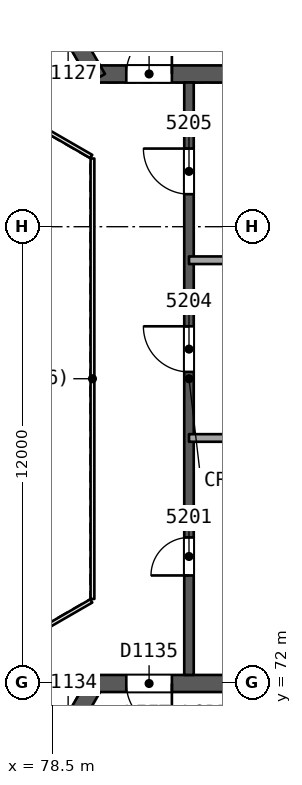
"""IFC4 building model, lengths in metres.
Left out: names, types, materials, properties, quantities, classifications, styles, units other than length and angle.
Written with IfcOpenShell. Run it as: python <this file> out.ifc"""

import sys

from ifc_helpers import new_model, si_unit, direction, frame, frame_2d, origin, place, context, subcontext, project, spatial, rectangle, extrude, element, fill, save


model = new_model("IFC4")
c1 = context("Model", 3, precision=1e-05, world=origin(), true_north=direction((0.0, 1.0)))
c2 = subcontext(c1, "Body", "Model", "MODEL_VIEW")
j1 = project(units=[si_unit("LENGTHUNIT", "METRE"), si_unit("PLANEANGLEUNIT", "RADIAN")], contexts=[c1])
p1 = place(None, origin())
s1 = spatial("IfcSite", under=j1, at=p1, CompositionType="ELEMENT")
p2 = place(p1, origin())
s2 = spatial("IfcBuilding", under=s1, at=p2, CompositionType="ELEMENT")
p3 = place(p2, frame((0.0, 0.0, 213.2)))
s3 = spatial("IfcBuildingStorey", under=s2, at=p3, CompositionType="ELEMENT", Elevation=213.2)
p4 = place(p3, frame((79.63, 88.019, 0.0), z_axis=(0.0, 0.0, 1.0), x_axis=(1.0, 0.0, 0.0)))
e1 = element("IfcWall", 1, at=p4, inside=s3, PredefinedType="SHEAR", context=c2, shape_type="SweptSolid", body=[
    extrude(rectangle(XDim=10.25, YDim=0.45, at=frame_2d((5.125, 0.0))), origin(), (0.0, 0.0, 1.0), 3.7),
])
p5 = place(p4, frame((0.82, 0.0, 0.0)))
e2 = element("IfcOpeningElement", 2, at=p5, cuts=e1, PredefinedType="OPENING", context=c2, shape_type="SweptSolid", body=[
    extrude(rectangle(XDim=1.2, YDim=2.1, at=frame_2d((0.6, 1.05))), frame((0.0, 0.235, 0.0), z_axis=(0.0, -1.0, 0.0), x_axis=(1.0, 0.0, 0.0)), (0.0, 0.0, 1.0), 0.471),
])
p6 = place(p3, frame((74.617, 96.701, 0.0), z_axis=(0.0, 0.0, 1.0), x_axis=(0.499994385119, -0.866028645513, 0.0)))
e3 = element("IfcWall", 3, at=p6, inside=s3, PredefinedType="SHEAR", context=c2, shape_type="SweptSolid", body=[
    extrude(rectangle(XDim=10.155, YDim=0.45, at=frame_2d((5.077, 0.0))), origin(), (0.0, 0.0, 1.0), 3.7),
])
p7 = place(p6, frame((8.005, 0.0, 0.0)))
e4 = element("IfcOpeningElement", 4, at=p7, cuts=e3, PredefinedType="OPENING", context=c2, shape_type="SweptSolid", body=[
    extrude(rectangle(XDim=1.2, YDim=2.1, at=frame_2d((0.6, 1.05))), frame((0.0, 0.235, 0.0), z_axis=(0.0, -1.0, 0.0), x_axis=(1.0, 0.0, 0.0)), (0.0, 0.0, 1.0), 0.471),
])
p8 = place(p3, frame((79.63, 71.981, 0.0), z_axis=(0.0, 0.0, 1.0), x_axis=(-0.500002171595, -0.86602415001, 0.0)))
e5 = element("IfcWall", 5, at=p8, inside=s3, PredefinedType="SHEAR", context=c2, shape_type="SweptSolid", body=[
    extrude(rectangle(XDim=10.25, YDim=0.45, at=frame_2d((5.125, 0.0))), origin(), (0.0, 0.0, 1.0), 3.7),
])
p9 = place(p8, frame((0.82, 0.0, 0.0)))
e6 = element("IfcOpeningElement", 6, at=p9, cuts=e5, PredefinedType="OPENING", context=c2, shape_type="SweptSolid", body=[
    extrude(rectangle(XDim=1.2, YDim=2.1, at=frame_2d((0.6, 1.05))), frame((0.0, 0.235, 0.0), z_axis=(0.0, -1.0, 0.0), x_axis=(1.0, 0.0, 0.0)), (0.0, 0.0, 1.0), 0.471),
])
p10 = place(p3, frame((89.655, 71.981, 0.0), z_axis=(0.0, 0.0, 1.0), x_axis=(-1.0, 0.0, 0.0)))
e7 = element("IfcWall", 7, at=p10, inside=s3, PredefinedType="SHEAR", context=c2, shape_type="SweptSolid", body=[
    extrude(rectangle(XDim=10.155, YDim=0.45, at=frame_2d((5.078, 0.0))), origin(), (0.0, 0.0, 1.0), 3.7),
])
p11 = place(p10, frame((8.005, 0.0, 0.0)))
e8 = element("IfcOpeningElement", 8, at=p11, cuts=e7, PredefinedType="OPENING", context=c2, shape_type="SweptSolid", body=[
    extrude(rectangle(XDim=1.2, YDim=2.1, at=frame_2d((0.6, 1.05))), frame((0.0, 0.235, 0.0), z_axis=(0.0, -1.0, 0.0), x_axis=(1.0, 0.0, 0.0)), (0.0, 0.0, 1.0), 0.471),
])
p12 = place(p3, frame((82.1, 72.206, 0.0), z_axis=(0.0, 0.0, 1.0), x_axis=(0.0, 1.0, 0.0)))
e9 = element("IfcWall", 9, at=p12, inside=s3, PredefinedType="SHEAR", context=c2, shape_type="SweptSolid", body=[
    extrude(rectangle(XDim=15.588, YDim=0.25, at=frame_2d((7.794, 0.0))), origin(), (0.0, 0.0, 1.0), 3.3),
])
p13 = place(p12, frame((2.618, 0.0, 0.0)))
e10 = element("IfcOpeningElement", 10, at=p13, cuts=e9, PredefinedType="OPENING", context=c2, shape_type="SweptSolid", body=[
    extrude(rectangle(XDim=1.0, YDim=2.1, at=frame_2d((0.5, 1.05))), frame((0.0, 0.135, 0.0), z_axis=(0.0, -1.0, 0.0), x_axis=(1.0, 0.0, 0.0)), (0.0, 0.0, 1.0), 0.271),
])
p14 = place(p12, frame((7.974, 0.0, 0.0)))
e11 = element("IfcOpeningElement", 11, at=p14, cuts=e9, PredefinedType="OPENING", context=c2, shape_type="SweptSolid", body=[
    extrude(rectangle(XDim=1.2, YDim=2.4, at=frame_2d((0.6, 1.2))), frame((0.0, 0.135, 0.0), z_axis=(0.0, -1.0, 0.0), x_axis=(1.0, 0.0, 0.0)), (0.0, 0.0, 1.0), 0.271),
])
p15 = place(p12, frame((12.65, 0.0, 0.0)))
e12 = element("IfcOpeningElement", 12, at=p15, cuts=e9, PredefinedType="OPENING", context=c2, shape_type="SweptSolid", body=[
    extrude(rectangle(XDim=1.2, YDim=2.4, at=frame_2d((0.6, 1.2))), frame((0.0, 0.135, 0.0), z_axis=(0.0, -1.0, 0.0), x_axis=(1.0, 0.0, 0.0)), (0.0, 0.0, 1.0), 0.271),
])
for number, where, z_axis, x_axis in (
    (13, (92.652, 78.441, 0.0), (0.0, 0.0, 1.0), (-1.0, 0.0, 0.0)),
    (14, (92.652, 83.118, 0.0), (0.0, 0.0, 1.0), (-1.0, 0.0, 0.0)),
):
    element("IfcWall", number, at=place(p3, frame(where, z_axis=z_axis, x_axis=x_axis)), inside=s3, PredefinedType="PARTITIONING", context=c2, shape_type="SweptSolid", body=[
        extrude(rectangle(XDim=10.552, YDim=0.2, at=frame_2d((5.276, 0.0))), origin(), (0.0, 0.0, 1.0), 3.3),
    ])
p16 = place(p3, frame((43.933, 82.619, 0.0), z_axis=(0.0, 0.0, 1.0), x_axis=(0.866026349667, 0.49999836168, 0.0)))
e15 = element("IfcWall", 15, at=p16, inside=s3, PredefinedType="SOLIDWALL", context=c2, shape_type="SweptSolid", body=[
    extrude(rectangle(XDim=51.192, YDim=0.3, at=frame_2d((25.596, 0.0))), origin(), (0.0, 0.0, 1.0), 3.3),
])
p17 = place(p16, frame((24.552, 0.0, 0.0)))
e16 = element("IfcOpeningElement", 16, at=p17, cuts=e15, PredefinedType="OPENING", context=c2, shape_type="SweptSolid", body=[
    extrude(rectangle(XDim=2.4, YDim=2.4, at=frame_2d((1.2, 1.2))), frame((0.0, 0.161, 0.0), z_axis=(0.0, -1.0, 0.0), x_axis=(1.0, 0.0, 0.0)), (0.0, 0.0, 1.0), 0.321),
])
p18 = place(p16, frame((29.228, 0.0, 0.0)))
e17 = element("IfcOpeningElement", 17, at=p18, cuts=e15, PredefinedType="OPENING", context=c2, shape_type="SweptSolid", body=[
    extrude(rectangle(XDim=2.4, YDim=2.4, at=frame_2d((1.2, 1.2))), frame((0.0, 0.161, 0.0), z_axis=(0.0, -1.0, 0.0), x_axis=(1.0, 0.0, 0.0)), (0.0, 0.0, 1.0), 0.321),
])
p19 = place(p16, frame((39.819, 0.0, 0.0)))
e18 = element("IfcOpeningElement", 18, at=p19, cuts=e15, PredefinedType="OPENING", context=c2, shape_type="SweptSolid", body=[
    extrude(rectangle(XDim=2.4, YDim=2.4, at=frame_2d((1.2, 1.2))), frame((0.0, 0.161, 0.0), z_axis=(0.0, -1.0, 0.0), x_axis=(1.0, 0.0, 0.0)), (0.0, 0.0, 1.0), 0.321),
])
p20 = place(p16, frame((19.719, 0.0, 0.0)))
e19 = element("IfcOpeningElement", 19, at=p20, cuts=e15, PredefinedType="OPENING", context=c2, shape_type="SweptSolid", body=[
    extrude(rectangle(XDim=2.4, YDim=2.4, at=frame_2d((1.2, 1.2))), frame((0.0, 0.161, 0.0), z_axis=(0.0, -1.0, 0.0), x_axis=(1.0, 0.0, 0.0)), (0.0, 0.0, 1.0), 0.321),
])
p21 = place(p16, frame((8.993, 0.0, 0.0)))
e20 = element("IfcOpeningElement", 20, at=p21, cuts=e15, PredefinedType="OPENING", context=c2, shape_type="SweptSolid", body=[
    extrude(rectangle(XDim=2.4, YDim=2.4, at=frame_2d((1.2, 1.2))), frame((0.0, 0.161, 0.0), z_axis=(0.0, -1.0, 0.0), x_axis=(1.0, 0.0, 0.0)), (0.0, 0.0, 1.0), 0.321),
])
p22 = place(p3, frame((88.266, 51.786, 0.0), z_axis=(0.0, 0.0, 1.0), x_axis=(-0.866026349667, 0.49999836168, 0.0)))
e21 = element("IfcWall", 21, at=p22, inside=s3, PredefinedType="SOLIDWALL", context=c2, shape_type="SweptSolid", body=[
    extrude(rectangle(XDim=51.192, YDim=0.3, at=frame_2d((25.596, 0.0))), origin(), (0.0, 0.0, 1.0), 3.3),
])
p23 = place(p22, frame((24.864, 0.0, 0.0)))
e22 = element("IfcOpeningElement", 22, at=p23, cuts=e21, PredefinedType="OPENING", context=c2, shape_type="SweptSolid", body=[
    extrude(rectangle(XDim=2.4, YDim=2.4, at=frame_2d((1.2, 1.2))), frame((0.0, 0.161, 0.0), z_axis=(0.0, -1.0, 0.0), x_axis=(1.0, 0.0, 0.0)), (0.0, 0.0, 1.0), 0.321),
])
p24 = place(p22, frame((19.719, 0.0, 0.0)))
e23 = element("IfcOpeningElement", 23, at=p24, cuts=e21, PredefinedType="OPENING", context=c2, shape_type="SweptSolid", body=[
    extrude(rectangle(XDim=2.4, YDim=2.4, at=frame_2d((1.2, 1.2))), frame((0.0, 0.161, 0.0), z_axis=(0.0, -1.0, 0.0), x_axis=(1.0, 0.0, 0.0)), (0.0, 0.0, 1.0), 0.321),
])
p25 = place(p22, frame((8.993, 0.0, 0.0)))
e24 = element("IfcOpeningElement", 24, at=p25, cuts=e21, PredefinedType="OPENING", context=c2, shape_type="SweptSolid", body=[
    extrude(rectangle(XDim=2.4, YDim=2.4, at=frame_2d((1.2, 1.2))), frame((0.0, 0.161, 0.0), z_axis=(0.0, -1.0, 0.0), x_axis=(1.0, 0.0, 0.0)), (0.0, 0.0, 1.0), 0.321),
])
p26 = place(p22, frame((38.484, 0.0, 0.0)))
e25 = element("IfcOpeningElement", 25, at=p26, cuts=e21, PredefinedType="OPENING", context=c2, shape_type="SweptSolid", body=[
    extrude(rectangle(XDim=2.4, YDim=2.4, at=frame_2d((1.2, 1.2))), frame((0.0, 0.161, 0.0), z_axis=(0.0, -1.0, 0.0), x_axis=(1.0, 0.0, 0.0)), (0.0, 0.0, 1.0), 0.321),
])
p27 = place(p3, frame((79.56, 74.206, 0.0), z_axis=(0.0, 0.0, 1.0), x_axis=(0.0, 1.0, 0.0)))
e26 = element("IfcWall", 26, at=p27, inside=s3, PredefinedType="PARTITIONING", context=c2, shape_type="SweptSolid", body=[
    extrude(rectangle(XDim=11.588, YDim=0.1, at=frame_2d((5.794, 0.0))), origin(), (0.0, 0.0, 1.0), 3.3),
])
for number, where, z_axis, x_axis in (
    (27, (79.53, 85.846, 0.0), (0.0, 0.0, 1.0), (-0.866, 0.5, 0.0)),
    (28, (77.798, 73.154, 0.0), (0.0, 0.0, 1.0), (0.866, 0.5, 0.0)),
):
    element("IfcWall", number, at=place(p3, frame(where, z_axis=z_axis, x_axis=x_axis)), inside=s3, PredefinedType="PARTITIONING", context=c2, shape_type="SweptSolid", body=[
        extrude(rectangle(XDim=2.0, YDim=0.1, at=frame_2d((1.0, 0.0))), origin(), (0.0, 0.0, 1.0), 3.3),
    ])
p28 = place(p13, origin())
e29 = element("IfcDoor", 29, at=p28, inside=s3, OperationType="SINGLE_SWING_LEFT", PredefinedType="NOTDEFINED", context=c2, shape_type="SweptSolid", body=[
    extrude(rectangle(XDim=1.0, YDim=2.1, at=frame_2d((0.5, 1.05))), frame((0.0, 0.025, 0.0), z_axis=(0.0, -1.0, 0.0), x_axis=(1.0, 0.0, 0.0)), (0.0, 0.0, 1.0), 0.05),
])
fill(e10, e29)
p29 = place(p14, origin())
e30 = element("IfcDoor", 30, at=p29, inside=s3, OperationType="SINGLE_SWING_RIGHT", PredefinedType="NOTDEFINED", context=c2, shape_type="SweptSolid", body=[
    extrude(rectangle(XDim=1.2, YDim=2.4, at=frame_2d((0.6, 1.2))), frame((0.0, 0.025, 0.0), z_axis=(0.0, -1.0, 0.0), x_axis=(1.0, 0.0, 0.0)), (0.0, 0.0, 1.0), 0.05),
])
fill(e11, e30)
p30 = place(p15, origin())
e31 = element("IfcDoor", 31, at=p30, inside=s3, OperationType="SINGLE_SWING_RIGHT", PredefinedType="NOTDEFINED", context=c2, shape_type="SweptSolid", body=[
    extrude(rectangle(XDim=1.2, YDim=2.4, at=frame_2d((0.6, 1.2))), frame((0.0, 0.025, 0.0), z_axis=(0.0, -1.0, 0.0), x_axis=(1.0, 0.0, 0.0)), (0.0, 0.0, 1.0), 0.05),
])
fill(e12, e31)
p31 = place(p5, origin())
e32 = element("IfcDoor", 32, at=p31, inside=s3, OperationType="SINGLE_SWING_RIGHT", PredefinedType="NOTDEFINED", context=c2, shape_type="SweptSolid", body=[
    extrude(rectangle(XDim=1.2, YDim=2.1, at=frame_2d((0.6, 1.05))), frame((0.0, 0.025, 0.0), z_axis=(0.0, -1.0, 0.0), x_axis=(1.0, 0.0, 0.0)), (0.0, 0.0, 1.0), 0.05),
])
fill(e2, e32)
p32 = place(p11, origin())
e33 = element("IfcDoor", 33, at=p32, inside=s3, OperationType="SINGLE_SWING_LEFT", PredefinedType="NOTDEFINED", context=c2, shape_type="SweptSolid", body=[
    extrude(rectangle(XDim=1.2, YDim=2.1, at=frame_2d((0.6, 1.05))), frame((0.0, 0.025, 0.0), z_axis=(0.0, -1.0, 0.0), x_axis=(1.0, 0.0, 0.0)), (0.0, 0.0, 1.0), 0.05),
])
fill(e8, e33)
save(model, sys.argv[1])
